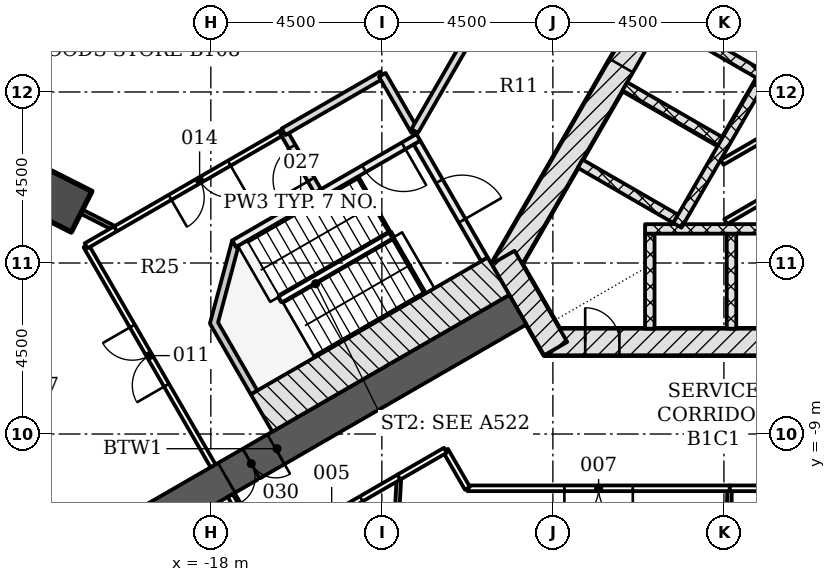
"""IFC4 building model, lengths in metres.
Left out: names, types, materials, properties, quantities, classifications, styles, units other than length and angle.
Written with IfcOpenShell. Run it as: python <this file> out.ifc"""

import sys

from ifc_helpers import new_model, si_unit, direction, frame, frame_2d, origin, origin_2d, place, context, subcontext, project, spatial, polyline, rectangle, outline, extrude, element, fill, save


model = new_model("IFC4")
c1 = context("Model", 3, precision=1e-05, world=origin(), true_north=direction((0.0, 1.0)))
c2 = subcontext(c1, "Body", "Model", "MODEL_VIEW")
j1 = project(units=[si_unit("LENGTHUNIT", "METRE"), si_unit("PLANEANGLEUNIT", "RADIAN")], contexts=[c1])
p1 = place(None, origin())
s1 = spatial("IfcSite", under=j1, at=p1, CompositionType="ELEMENT")
p2 = place(p1, origin())
s2 = spatial("IfcBuilding", under=s1, at=p2, CompositionType="ELEMENT")
p3 = place(p2, frame((0.0, 0.0, -4.5)))
s3 = spatial("IfcBuildingStorey", under=s2, at=p3, CompositionType="ELEMENT", Elevation=-4.5)
p4 = place(p3, frame((-21.937, -2.88, -0.3), z_axis=(0.0, 0.0, 1.0), x_axis=(-0.89250065469, 0.451046096733, 0.0)))
e1 = element("IfcColumn", 1, at=p4, inside=s3, PredefinedType="COLUMN", context=c2, shape_type="SweptSolid", body=[
    extrude(rectangle(XDim=1.2, YDim=1.2, at=origin_2d()), origin(), (0.0, 0.0, 1.0), 4.55),
])
p5 = place(p3, frame((-9.229, -6.578, -0.3), z_axis=(0.0, 0.0, 1.0), x_axis=(1.0, 0.0, 0.0)))
e2 = element("IfcWall", 2, at=p5, inside=s3, PredefinedType="SHEAR", context=c2, shape_type="SweptSolid", body=[
    extrude(rectangle(XDim=18.458, YDim=0.7, at=frame_2d((9.229, 0.0))), origin(), (0.0, 0.0, 1.0), 4.55),
])
p6 = place(p5, frame((1.079, 0.0, 0.3)))
e3 = element("IfcOpeningElement", 3, at=p6, cuts=e2, PredefinedType="OPENING", context=c2, shape_type="SweptSolid", body=[
    extrude(rectangle(XDim=0.9, YDim=2.1, at=frame_2d((0.45, 1.05))), frame((0.0, 0.36, 0.0), z_axis=(0.0, -1.0, 0.0), x_axis=(1.0, 0.0, 0.0)), (0.0, 0.0, 1.0), 0.72),
])
p7 = place(p3, frame((-1.083, 11.281, -0.3), z_axis=(0.0, 0.0, 1.0), x_axis=(-0.500001446645, -0.866024568562, 0.0)))
e4 = element("IfcWall", 4, at=p7, inside=s3, PredefinedType="SHEAR", context=c2, shape_type="SweptSolid", body=[
    extrude(rectangle(XDim=18.458, YDim=0.7, at=frame_2d((9.229, 0.0))), origin(), (0.0, 0.0, 1.0), 4.55),
])
p8 = place(p7, frame((8.979, 0.0, 0.3)))
e5 = element("IfcOpeningElement", 5, at=p8, cuts=e4, PredefinedType="OPENING", context=c2, shape_type="SweptSolid", body=[
    extrude(rectangle(XDim=1.2, YDim=2.1, at=frame_2d((0.6, 1.05))), frame((0.0, 0.36, 0.0), z_axis=(0.0, -1.0, 0.0), x_axis=(1.0, 0.0, 0.0)), (0.0, 0.0, 1.0), 0.72),
])
p9 = place(p7, frame((11.029, 0.0, 0.3)))
e6 = element("IfcOpeningElement", 6, at=p9, cuts=e4, PredefinedType="OPENING", context=c2, shape_type="SweptSolid", body=[
    extrude(rectangle(XDim=1.2, YDim=2.1, at=frame_2d((0.6, 1.05))), frame((0.0, 0.36, 0.0), z_axis=(0.0, -1.0, 0.0), x_axis=(1.0, 0.0, 0.0)), (0.0, 0.0, 1.0), 0.72),
])
p10 = place(p3, frame((-10.311, -4.353, -0.3), z_axis=(0.0, 0.0, 1.0), x_axis=(0.500042739161, -0.866000726912, 0.0)))
e7 = element("IfcWall", 7, at=p10, inside=s3, PredefinedType="SHEAR", context=c2, shape_type="SweptSolid", body=[
    extrude(rectangle(XDim=2.771, YDim=0.7, at=frame_2d((1.386, 0.0))), origin(), (0.0, 0.0, 1.0), 4.55),
])
p11 = place(p3, frame((-9.922, -5.728, -0.3), z_axis=(0.0, 0.0, 1.0), x_axis=(-0.866028046028, -0.499995423472, 0.0)))
e8 = element("IfcWall", 8, at=p11, inside=s3, PredefinedType="SHEAR", context=c2, shape_type="SweptSolid", body=[
    extrude(rectangle(XDim=14.633, YDim=0.9, at=frame_2d((7.316, 0.0))), origin(), (0.0, 0.0, 1.0), 4.55),
])
p12 = place(p11, frame((7.35, 0.0, 0.3)))
e9 = element("IfcOpeningElement", 9, at=p12, cuts=e8, PredefinedType="OPENING", context=c2, shape_type="SweptSolid", body=[
    extrude(rectangle(XDim=1.5, YDim=2.1, at=frame_2d((0.75, 1.05))), frame((0.0, 0.46, 0.0), z_axis=(0.0, -1.0, 0.0), x_axis=(1.0, 0.0, 0.0)), (0.0, 0.0, 1.0), 0.92),
])
for number, where, z_axis, x_axis in (
    (10, (-6.45, -6.228, 0.0), (0.0, 0.0, 1.0), (0.0, 1.0, 0.0)),
    (11, (-4.3, -6.228, 0.0), (0.0, 0.0, 1.0), (0.0, 1.0, 0.0)),
):
    element("IfcWall", number, at=place(p3, frame(where, z_axis=z_axis, x_axis=x_axis)), inside=s3, PredefinedType="PARTITIONING", context=c2, shape_type="SweptSolid", body=[
        extrude(rectangle(XDim=2.5, YDim=0.25, at=frame_2d((1.25, 0.0))), origin(), (0.0, 0.0, 1.0), 4.25),
    ])
p13 = place(p3, frame((-6.575, -3.603, 0.0), z_axis=(0.0, 0.0, 1.0), x_axis=(1.0, 0.0, 0.0)))
e12 = element("IfcWall", 12, at=p13, inside=s3, PredefinedType="PARTITIONING", context=c2, shape_type="SweptSolid", body=[
    extrude(rectangle(XDim=13.15, YDim=0.25, at=frame_2d((6.575, 0.0))), origin(), (0.0, 0.0, 1.0), 4.25),
])
for number, where, z_axis, x_axis in (
    (13, (-6.081, 1.923, -0.3), (0.0, 0.0, 1.0), (0.866, -0.5, 0.0)),
    (14, (-7.106, 0.148, -0.3), (0.0, 0.0, 1.0), (0.866, -0.5, 0.0)),
):
    element("IfcWall", number, at=place(p3, frame(where, z_axis=z_axis, x_axis=x_axis)), inside=s3, PredefinedType="PARTITIONING", context=c2, shape_type="SweptSolid", body=[
        extrude(rectangle(XDim=2.9, YDim=0.25, at=frame_2d((1.45, 0.0))), origin(), (0.0, 0.0, 1.0), 4.55),
    ])
p14 = place(p3, frame((-8.281, -1.887, 0.0), z_axis=(0.0, 0.0, 1.0), x_axis=(0.866032775405, -0.499987231761, 0.0)))
e15 = element("IfcWall", 15, at=p14, inside=s3, PredefinedType="PARTITIONING", context=c2, shape_type="SweptSolid", body=[
    extrude(rectangle(XDim=2.9, YDim=0.25, at=frame_2d((1.45, 0.0))), origin(), (0.0, 0.0, 1.0), 4.25),
])
p15 = place(p3, frame((0.176, 6.711, 0.0), z_axis=(0.0, 0.0, 1.0), x_axis=(-0.500004227369, -0.866022963098, 0.0)))
e16 = element("IfcWall", 16, at=p15, inside=s3, PredefinedType="PARTITIONING", context=c2, shape_type="SweptSolid", body=[
    extrude(rectangle(XDim=11.8, YDim=0.25, at=frame_2d((5.9, 0.0))), origin(), (0.0, 0.0, 1.0), 4.25),
])
p16 = place(p3, frame((-4.548, -1.851, 0.0), z_axis=(0.0, 0.0, 1.0), x_axis=(0.866023939251, 0.500002536638, 0.0)))
e17 = element("IfcWall", 17, at=p16, inside=s3, PredefinedType="PARTITIONING", context=c2, shape_type="SweptSolid", body=[
    extrude(rectangle(XDim=11.092, YDim=0.15, at=frame_2d((5.546, 0.0))), origin(), (0.0, 0.0, 1.0), 4.25),
])
p17 = place(p16, frame((3.497, 0.0, 0.0)))
e18 = element("IfcOpeningElement", 18, at=p17, cuts=e17, PredefinedType="OPENING", context=c2, shape_type="SweptSolid", body=[
    extrude(rectangle(XDim=0.9, YDim=2.1, at=frame_2d((0.45, 1.05))), frame((0.0, 0.085, 0.0), z_axis=(0.0, -1.0, 0.0), x_axis=(1.0, 0.0, 0.0)), (0.0, 0.0, 1.0), 0.17),
])
p18 = place(p3, frame((-4.454, -3.413, 0.0), z_axis=(0.0, 0.0, 1.0), x_axis=(0.86603043987, 0.499991277142, 0.0)))
e19 = element("IfcWall", 19, at=p18, inside=s3, PredefinedType="PARTITIONING", context=c2, shape_type="SweptSolid", body=[
    extrude(rectangle(XDim=11.792, YDim=0.15, at=frame_2d((5.896, 0.0))), origin(), (0.0, 0.0, 1.0), 4.25),
])
p19 = place(p18, frame((3.847, 0.0, 0.0)))
e20 = element("IfcOpeningElement", 20, at=p19, cuts=e19, PredefinedType="OPENING", context=c2, shape_type="SweptSolid", body=[
    extrude(rectangle(XDim=0.9, YDim=2.1, at=frame_2d((0.45, 1.05))), frame((0.0, 0.085, 0.0), z_axis=(0.0, -1.0, 0.0), x_axis=(1.0, 0.0, 0.0)), (0.0, 0.0, 1.0), 0.17),
])
p20 = place(p3, frame((-12.576, -1.331, -0.3), z_axis=(0.0, 0.0, 1.0), x_axis=(0.499970499736, -0.8660424351, 0.0)))
e21 = element("IfcWall", 21, at=p20, inside=s3, PredefinedType="SHEAR", context=c2, shape_type="SweptSolid", body=[
    extrude(rectangle(XDim=3.55, YDim=0.2, at=frame_2d((1.775, 0.0))), origin(), (0.0, 0.0, 1.0), 4.55),
])
p21 = place(p20, frame((1.175, 0.0, 0.3)))
e22 = element("IfcOpeningElement", 22, at=p21, cuts=e21, PredefinedType="OPENING", context=c2, shape_type="SweptSolid", body=[
    extrude(rectangle(XDim=1.2, YDim=2.1, at=frame_2d((0.6, 1.05))), frame((0.0, 0.11, 0.0), z_axis=(0.0, -1.0, 0.0), x_axis=(1.0, 0.0, 0.0)), (0.0, 0.0, 1.0), 0.22),
])
p22 = place(p3, frame((-12.539, -1.194, -0.3), z_axis=(0.0, 0.0, 1.0), x_axis=(-0.866045472092, -0.499965239061, 0.0)))
e23 = element("IfcWall", 23, at=p22, inside=s3, PredefinedType="SHEAR", context=c2, shape_type="SweptSolid", body=[
    extrude(rectangle(XDim=5.6, YDim=0.2, at=frame_2d((2.8, 0.0))), origin(), (0.0, 0.0, 1.0), 4.55),
])
p23 = place(p22, frame((0.45, 0.0, 0.3)))
e24 = element("IfcOpeningElement", 24, at=p23, cuts=e23, PredefinedType="OPENING", context=c2, shape_type="SweptSolid", body=[
    extrude(rectangle(XDim=1.2, YDim=2.1, at=frame_2d((0.6, 1.05))), frame((0.0, 0.11, 0.0), z_axis=(0.0, -1.0, 0.0), x_axis=(1.0, 0.0, 0.0)), (0.0, 0.0, 1.0), 0.22),
])
p24 = place(p3, frame((-10.43, -4.847, -0.3), z_axis=(0.0, 0.0, 1.0), x_axis=(-0.866018442252, -0.500012057535, 0.0)))
e25 = element("IfcWall", 25, at=p24, inside=s3, PredefinedType="SHEAR", context=c2, shape_type="SweptSolid", body=[
    extrude(rectangle(XDim=7.2, YDim=1.136, at=frame_2d((3.6, 0.0))), origin(), (0.0, 0.0, 1.0), 4.55),
])
p25 = place(p3, frame((0.0, 0.0, -0.3)))
e26 = element("IfcWall", 26, at=p25, inside=s3, PredefinedType="SHEAR", context=c2, shape_type="SweptSolid", body=[
    extrude(outline(polyline([(-17.439, -3.907), (-18.025, -6.093), (-16.95, -7.955), (-16.777, -7.855), (-17.81, -6.065), (-17.267, -4.039), (-17.339, -4.081), (-17.339, -4.081), (-17.339, -4.081), (-17.339, -4.081), (-17.339, -4.081), (-17.339, -4.081), (-17.339, -4.081), (-17.339, -4.081), (-17.339, -4.081), (-17.339, -4.081), (-17.339, -4.081), (-17.339, -4.081), (-17.339, -4.081), (-17.339, -4.081), (-17.339, -4.081), (-17.339, -4.081), (-17.339, -4.081), (-17.439, -3.907)])), origin(), (0.0, 0.0, 1.0), 4.55),
])
p26 = place(p3, frame((-13.429, -16.96, 0.0), z_axis=(0.0, 0.0, 1.0), x_axis=(0.055551088657, 0.998455846069, 0.0)))
e27 = element("IfcWall", 27, at=p26, inside=s3, PredefinedType="PARTITIONING", context=c2, shape_type="SweptSolid", body=[
    extrude(rectangle(XDim=6.838, YDim=0.12, at=frame_2d((3.419, 0.0))), origin(), (0.0, 0.0, 1.0), 3.638),
])
p27 = place(p3, frame((-13.045, -10.13, 0.0), z_axis=(0.0, 0.0, 1.0), x_axis=(-0.866035577775, -0.499982377718, 0.0)))
e28 = element("IfcWall", 28, at=p27, inside=s3, PredefinedType="PARTITIONING", context=c2, shape_type="SweptSolid", body=[
    extrude(rectangle(XDim=4.093, YDim=0.15, at=frame_2d((2.046, 0.0))), origin(), (0.0, 0.0, 1.0), 3.638),
])
p28 = place(p27, frame((1.15, 0.0, 0.0)))
e29 = element("IfcOpeningElement", 29, at=p28, cuts=e28, PredefinedType="OPENING", context=c2, shape_type="SweptSolid", body=[
    extrude(rectangle(XDim=1.8, YDim=2.1, at=frame_2d((0.9, 1.05))), frame((0.0, 0.085, 0.0), z_axis=(0.0, -1.0, 0.0), x_axis=(1.0, 0.0, 0.0)), (0.0, 0.0, 1.0), 0.17),
])
p29 = place(p3, frame((-16.591, -12.176, 0.0), z_axis=(0.0, 0.0, 1.0), x_axis=(-0.499965372359, 0.866045395139, 0.0)))
e30 = element("IfcWall", 30, at=p29, inside=s3, PredefinedType="PARTITIONING", context=c2, shape_type="SweptSolid", body=[
    extrude(rectangle(XDim=1.798, YDim=0.15, at=frame_2d((0.899, 0.0))), origin(), (0.0, 0.0, 1.0), 3.638),
])
p30 = place(p3, frame((-4.351, -10.429, 0.0), z_axis=(0.0, 0.0, 1.0), x_axis=(-0.018497563981, -0.999828905427, 0.0)))
e31 = element("IfcWall", 31, at=p30, inside=s3, PredefinedType="PARTITIONING", context=c2, shape_type="SweptSolid", body=[
    extrude(rectangle(XDim=6.863, YDim=0.12, at=frame_2d((3.432, 0.0))), origin(), (0.0, 0.0, 1.0), 3.638),
])
p31 = place(p3, frame((0.004, -10.428, 0.0), z_axis=(0.0, 0.0, 1.0), x_axis=(-1.0, 0.0, 0.0)))
e32 = element("IfcWall", 32, at=p31, inside=s3, PredefinedType="PARTITIONING", context=c2, shape_type="SweptSolid", body=[
    extrude(rectangle(XDim=4.359, YDim=0.15, at=frame_2d((2.179, 0.0))), origin(), (0.0, 0.0, 1.0), 3.638),
])
p32 = place(p31, frame((1.65, 0.0, 0.0)))
e33 = element("IfcOpeningElement", 33, at=p32, cuts=e32, PredefinedType="OPENING", context=c2, shape_type="SweptSolid", body=[
    extrude(rectangle(XDim=1.0, YDim=2.1, at=frame_2d((0.5, 1.05))), frame((0.0, 0.085, 0.0), z_axis=(0.0, -1.0, 0.0), x_axis=(1.0, 0.0, 0.0)), (0.0, 0.0, 1.0), 0.17),
])
p33 = place(p3, frame((-4.347, -10.428, 0.0), z_axis=(0.0, 0.0, 1.0), x_axis=(-1.0, 0.0, 0.0)))
e34 = element("IfcWall", 34, at=p33, inside=s3, PredefinedType="PARTITIONING", context=c2, shape_type="SweptSolid", body=[
    extrude(rectangle(XDim=6.902, YDim=0.15, at=frame_2d((3.451, 0.0))), origin(), (0.0, 0.0, 1.0), 3.638),
])
p34 = place(p33, frame((2.55, 0.0, 0.0)))
e35 = element("IfcOpeningElement", 35, at=p34, cuts=e34, PredefinedType="OPENING", context=c2, shape_type="SweptSolid", body=[
    extrude(rectangle(XDim=1.8, YDim=2.1, at=frame_2d((0.9, 1.05))), frame((0.0, 0.085, 0.0), z_axis=(0.0, -1.0, 0.0), x_axis=(1.0, 0.0, 0.0)), (0.0, 0.0, 1.0), 0.17),
])
p35 = place(p3, frame((-11.249, -10.428, 0.0), z_axis=(0.0, 0.0, 1.0), x_axis=(-0.499978438088, 0.866037852202, 0.0)))
e36 = element("IfcWall", 36, at=p35, inside=s3, PredefinedType="PARTITIONING", context=c2, shape_type="SweptSolid", body=[
    extrude(rectangle(XDim=1.156, YDim=0.15, at=frame_2d((0.578, 0.0))), origin(), (0.0, 0.0, 1.0), 4.25),
])
p36 = place(p3, frame((-11.828, -9.427, 0.0), z_axis=(0.0, 0.0, 1.0), x_axis=(-0.866110865696, -0.499851946404, 0.0)))
e37 = element("IfcWall", 37, at=p36, inside=s3, PredefinedType="PARTITIONING", context=c2, shape_type="SweptSolid", body=[
    extrude(rectangle(XDim=1.415, YDim=0.15, at=frame_2d((0.707, 0.0))), origin(), (0.0, 0.0, 1.0), 3.638),
])
p37 = place(p3, frame((-17.941, -9.838, 0.0), z_axis=(0.0, 0.0, 1.0), x_axis=(-0.500048140185, 0.865997608252, 0.0)))
e38 = element("IfcWall", 38, at=p37, inside=s3, PredefinedType="PARTITIONING", context=c2, shape_type="SweptSolid", body=[
    extrude(rectangle(XDim=6.683, YDim=0.15, at=frame_2d((3.342, 0.0))), origin(), (0.0, 0.0, 1.0), 3.638),
])
p38 = place(p37, frame((2.45, 0.0, 0.0)))
e39 = element("IfcOpeningElement", 39, at=p38, cuts=e38, PredefinedType="OPENING", context=c2, shape_type="SweptSolid", body=[
    extrude(rectangle(XDim=1.8, YDim=2.1, at=frame_2d((0.9, 1.05))), frame((0.0, 0.085, 0.0), z_axis=(0.0, -1.0, 0.0), x_axis=(1.0, 0.0, 0.0)), (0.0, 0.0, 1.0), 0.17),
])
p39 = place(p3, frame((-21.283, -4.048, 0.0), z_axis=(0.0, 0.0, 1.0), x_axis=(0.865804825377, 0.500381858538, 0.0)))
e40 = element("IfcWall", 40, at=p39, inside=s3, PredefinedType="PARTITIONING", context=c2, shape_type="SweptSolid", body=[
    extrude(rectangle(XDim=0.897, YDim=0.15, at=frame_2d((0.449, 0.0))), origin(), (0.0, 0.0, 1.0), 3.638),
])
p40 = place(p3, frame((-20.509, -3.601, 0.0), z_axis=(0.0, 0.0, 1.0), x_axis=(-0.892316605155, 0.451410097544, 0.0)))
e41 = element("IfcWall", 41, at=p40, inside=s3, PredefinedType="PARTITIONING", context=c2, shape_type="SweptSolid", body=[
    extrude(rectangle(XDim=1.0, YDim=0.12, at=frame_2d((0.5, 0.0))), origin(), (0.0, 0.0, 1.0), 3.638),
])
p41 = place(p3, frame((-16.087, -1.049, 0.0), z_axis=(0.0, 0.0, 1.0), x_axis=(-0.866071706002, -0.49991979363, 0.0)))
e42 = element("IfcWall", 42, at=p41, inside=s3, PredefinedType="PARTITIONING", context=c2, shape_type="SweptSolid", body=[
    extrude(rectangle(XDim=5.105, YDim=0.15, at=frame_2d((2.552, 0.0))), origin(), (0.0, 0.0, 1.0), 3.638),
])
p42 = place(p41, frame((1.65, 0.0, 0.0)))
e43 = element("IfcOpeningElement", 43, at=p42, cuts=e42, PredefinedType="OPENING", context=c2, shape_type="SweptSolid", body=[
    extrude(rectangle(XDim=1.8, YDim=2.1, at=frame_2d((0.9, 1.05))), frame((0.0, 0.085, 0.0), z_axis=(0.0, -1.0, 0.0), x_axis=(1.0, 0.0, 0.0)), (0.0, 0.0, 1.0), 0.17),
])
p43 = place(p3, frame((-15.188, -2.607, 0.0), z_axis=(0.0, 0.0, 1.0), x_axis=(-0.500024172624, 0.866011447264, 0.0)))
e44 = element("IfcWall", 44, at=p43, inside=s3, PredefinedType="PARTITIONING", context=c2, shape_type="SweptSolid", body=[
    extrude(rectangle(XDim=1.798, YDim=0.2, at=frame_2d((0.899, 0.0))), origin(), (0.0, 0.0, 1.0), 3.638),
])
p44 = place(p43, frame((0.35, 0.0, 0.0)))
e45 = element("IfcOpeningElement", 45, at=p44, cuts=e44, PredefinedType="OPENING", context=c2, shape_type="SweptSolid", body=[
    extrude(rectangle(XDim=1.0, YDim=2.1, at=frame_2d((0.5, 1.05))), frame((0.0, 0.11, 0.0), z_axis=(0.0, -1.0, 0.0), x_axis=(1.0, 0.0, 0.0)), (0.0, 0.0, 1.0), 0.22),
])
p45 = place(p3, frame((-16.087, -1.048, 0.0), z_axis=(0.0, 0.0, 1.0), x_axis=(0.865988915629, 0.500063194015, 0.0)))
e46 = element("IfcWall", 46, at=p45, inside=s3, PredefinedType="PARTITIONING", context=c2, shape_type="SweptSolid", body=[
    extrude(rectangle(XDim=2.998, YDim=0.2, at=frame_2d((1.499, 0.0))), origin(), (0.0, 0.0, 1.0), 3.638),
])
p46 = place(p3, frame((-13.489, 0.451, 0.0), z_axis=(0.0, 0.0, 1.0), x_axis=(0.500044178772, -0.865999895656, 0.0)))
e47 = element("IfcWall", 47, at=p46, inside=s3, PredefinedType="PARTITIONING", context=c2, shape_type="SweptSolid", body=[
    extrude(rectangle(XDim=1.708, YDim=0.2, at=frame_2d((0.854, 0.0))), origin(), (0.0, 0.0, 1.0), 4.25),
])
p47 = place(p3, frame((-12.635, -1.028, 0.0), z_axis=(0.0, 0.0, 1.0), x_axis=(0.50005725472, 0.865992345233, 0.0)))
e48 = element("IfcWall", 48, at=p47, inside=s3, PredefinedType="PARTITIONING", context=c2, shape_type="SweptSolid", body=[
    extrude(rectangle(XDim=2.862, YDim=0.2, at=frame_2d((1.431, 0.0))), origin(), (0.0, 0.0, 1.0), 3.638),
])
p48 = place(p9, origin())
e49 = element("IfcDoor", 49, at=p48, inside=s3, OperationType="DOUBLE_DOOR_SLIDING", PredefinedType="DOOR", context=c2, shape_type="SweptSolid", body=[
    extrude(rectangle(XDim=1.2, YDim=2.1, at=frame_2d((0.6, 1.05))), frame((0.0, 0.025, 0.0), z_axis=(0.0, -1.0, 0.0), x_axis=(1.0, 0.0, 0.0)), (0.0, 0.0, 1.0), 0.05),
])
fill(e6, e49)
p49 = place(p6, origin())
e50 = element("IfcDoor", 50, at=p49, inside=s3, OperationType="SINGLE_SWING_LEFT", PredefinedType="DOOR", context=c2, shape_type="SweptSolid", body=[
    extrude(rectangle(XDim=0.9, YDim=2.1, at=frame_2d((0.45, 1.05))), frame((0.0, 0.075, 0.0), z_axis=(0.0, -1.0, 0.0), x_axis=(1.0, 0.0, 0.0)), (0.0, 0.0, 1.0), 0.15),
])
fill(e3, e50)
p50 = place(p21, origin())
e51 = element("IfcDoor", 51, at=p50, inside=s3, OperationType="SINGLE_SWING_RIGHT", PredefinedType="DOOR", context=c2, shape_type="SweptSolid", body=[
    extrude(rectangle(XDim=1.2, YDim=2.1, at=frame_2d((0.6, 1.05))), frame((0.0, 0.025, 0.0), z_axis=(0.0, -1.0, 0.0), x_axis=(1.0, 0.0, 0.0)), (0.0, 0.0, 1.0), 0.05),
])
fill(e22, e51)
p51 = place(p23, origin())
e52 = element("IfcDoor", 52, at=p51, inside=s3, OperationType="SINGLE_SWING_LEFT", PredefinedType="DOOR", context=c2, shape_type="SweptSolid", body=[
    extrude(rectangle(XDim=1.2, YDim=2.1, at=frame_2d((0.6, 1.05))), frame((0.0, 0.025, 0.0), z_axis=(0.0, -1.0, 0.0), x_axis=(1.0, 0.0, 0.0)), (0.0, 0.0, 1.0), 0.05),
])
fill(e24, e52)
p52 = place(p28, origin())
e53 = element("IfcDoor", 53, at=p52, inside=s3, OperationType="DOUBLE_DOOR_SINGLE_SWING", PredefinedType="DOOR", context=c2, shape_type="SweptSolid", body=[
    extrude(rectangle(XDim=1.8, YDim=2.1, at=frame_2d((0.9, 1.05))), frame((0.0, 0.025, 0.0), z_axis=(0.0, -1.0, 0.0), x_axis=(1.0, 0.0, 0.0)), (0.0, 0.0, 1.0), 0.05),
])
fill(e29, e53)
p53 = place(p34, origin())
e54 = element("IfcDoor", 54, at=p53, inside=s3, OperationType="DOUBLE_DOOR_SINGLE_SWING", PredefinedType="DOOR", context=c2, shape_type="SweptSolid", body=[
    extrude(rectangle(XDim=1.8, YDim=2.1, at=frame_2d((0.9, 1.05))), frame((0.0, 0.025, 0.0), z_axis=(0.0, -1.0, 0.0), x_axis=(1.0, 0.0, 0.0)), (0.0, 0.0, 1.0), 0.05),
])
fill(e35, e54)
p54 = place(p38, origin())
e55 = element("IfcDoor", 55, at=p54, inside=s3, OperationType="DOUBLE_DOOR_SINGLE_SWING", PredefinedType="DOOR", context=c2, shape_type="SweptSolid", body=[
    extrude(rectangle(XDim=1.8, YDim=2.1, at=frame_2d((0.9, 1.05))), frame((0.0, 0.025, 0.0), z_axis=(0.0, -1.0, 0.0), x_axis=(1.0, 0.0, 0.0)), (0.0, 0.0, 1.0), 0.05),
])
fill(e39, e55)
p55 = place(p42, origin())
e56 = element("IfcDoor", 56, at=p55, inside=s3, OperationType="DOUBLE_DOOR_SINGLE_SWING", PredefinedType="DOOR", context=c2, shape_type="SweptSolid", body=[
    extrude(rectangle(XDim=1.8, YDim=2.1, at=frame_2d((0.9, 1.05))), frame((0.0, 0.025, 0.0), z_axis=(0.0, -1.0, 0.0), x_axis=(1.0, 0.0, 0.0)), (0.0, 0.0, 1.0), 0.05),
])
fill(e43, e56)
p56 = place(p44, origin())
e57 = element("IfcDoor", 57, at=p56, inside=s3, OperationType="SINGLE_SWING_LEFT", PredefinedType="DOOR", context=c2, shape_type="SweptSolid", body=[
    extrude(rectangle(XDim=1.0, YDim=2.1, at=frame_2d((0.5, 1.05))), frame((0.0, 0.025, 0.0), z_axis=(0.0, -1.0, 0.0), x_axis=(1.0, 0.0, 0.0)), (0.0, 0.0, 1.0), 0.05),
])
fill(e45, e57)
p57 = place(p12, origin())
e58 = element("IfcDoor", 58, at=p57, inside=s3, OperationType="DOUBLE_DOOR_SINGLE_SWING", PredefinedType="DOOR", context=c2, shape_type="SweptSolid", body=[
    extrude(rectangle(XDim=1.5, YDim=2.1, at=frame_2d((0.75, 1.05))), frame((0.0, 0.025, 0.0), z_axis=(0.0, -1.0, 0.0), x_axis=(1.0, 0.0, 0.0)), (0.0, 0.0, 1.0), 0.05),
])
fill(e9, e58)
save(model, sys.argv[1])
